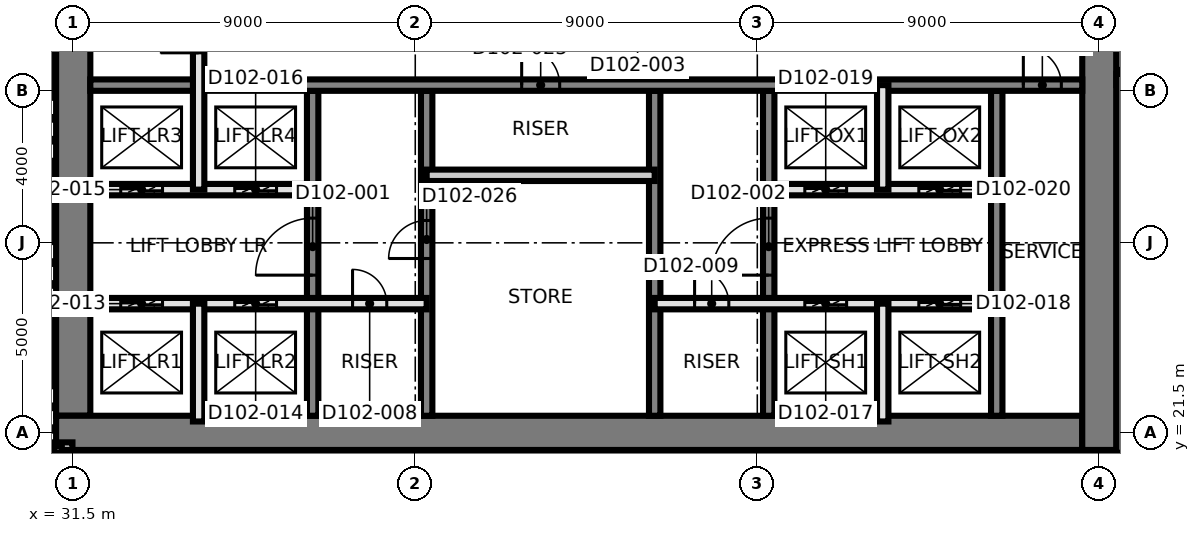
"""IFC4 building model, lengths in metres.
Left out: names, types, materials, properties, quantities, classifications, styles, units other than length and angle.
Written with IfcOpenShell. Run it as: python <this file> out.ifc"""

import sys

from ifc_helpers import new_model, si_unit, direction, frame, frame_2d, origin, place, context, subcontext, project, spatial, rectangle, extrude, element, fill, save


model = new_model("IFC4")
c1 = context("Model", 3, precision=1e-05, world=origin(), true_north=direction((0.0, 1.0)))
c2 = subcontext(c1, "Body", "Model", "MODEL_VIEW")
j1 = project(units=[si_unit("LENGTHUNIT", "METRE"), si_unit("PLANEANGLEUNIT", "RADIAN")], contexts=[c1])
p1 = place(None, origin())
s1 = spatial("IfcSite", under=j1, at=p1, CompositionType="ELEMENT")
p2 = place(p1, origin())
s2 = spatial("IfcBuilding", under=s1, at=p2, CompositionType="ELEMENT")
p3 = place(p2, origin())
s3 = spatial("IfcBuildingStorey", under=s2, at=p3, CompositionType="ELEMENT", Elevation=0.0)
p4 = place(p3, frame((31.5, 21.95, 0.0), z_axis=(0.0, 0.0, 1.0), x_axis=(0.0, 1.0, 0.0)))
e1 = element("IfcWall", 1, at=p4, inside=s3, PredefinedType="SHEAR", context=c2, shape_type="SweptSolid", body=[
    extrude(rectangle(XDim=17.1, YDim=0.9, at=frame_2d((8.55, 0.0))), origin(), (0.0, 0.0, 1.0), 8.0),
])
p5 = place(p3, frame((31.05, 21.5, 0.0), z_axis=(0.0, 0.0, 1.0), x_axis=(1.0, 0.0, 0.0)))
e2 = element("IfcWall", 2, at=p5, inside=s3, PredefinedType="SHEAR", context=c2, shape_type="SweptSolid", body=[
    extrude(rectangle(XDim=27.0, YDim=0.9, at=frame_2d((13.5, 0.0))), origin(), (0.0, 0.0, 1.0), 8.0),
])
p6 = place(p3, frame((58.5, 21.05, 0.0), z_axis=(0.0, 0.0, 1.0), x_axis=(0.0, 1.0, 0.0)))
e3 = element("IfcWall", 3, at=p6, inside=s3, PredefinedType="SHEAR", context=c2, shape_type="SweptSolid", body=[
    extrude(rectangle(XDim=18.9, YDim=0.9, at=frame_2d((9.45, 0.0))), origin(), (0.0, 0.0, 1.0), 8.0),
])
p7 = place(p3, frame((37.8, 21.95, 0.0), z_axis=(0.0, 0.0, 1.0), x_axis=(0.0, 1.0, 0.0)))
e4 = element("IfcWall", 4, at=p7, inside=s3, PredefinedType="SHEAR", context=c2, shape_type="SweptSolid", body=[
    extrude(rectangle(XDim=8.55, YDim=0.3, at=frame_2d((4.275, 0.0))), origin(), (0.0, 0.0, 1.0), 8.0),
])
p8 = place(p7, frame((3.7, 0.0, 0.0)))
e5 = element("IfcOpeningElement", 5, at=p8, cuts=e4, PredefinedType="OPENING", context=c2, shape_type="SweptSolid", body=[
    extrude(rectangle(XDim=1.5, YDim=2.1, at=frame_2d((0.75, 1.05))), frame((0.0, 0.16, 0.0), z_axis=(0.0, -1.0, 0.0), x_axis=(1.0, 0.0, 0.0)), (0.0, 0.0, 1.0), 0.32),
])
p9 = place(p3, frame((40.8, 21.95, 0.0), z_axis=(0.0, 0.0, 1.0), x_axis=(0.0, 1.0, 0.0)))
e6 = element("IfcWall", 6, at=p9, inside=s3, PredefinedType="SHEAR", context=c2, shape_type="SweptSolid", body=[
    extrude(rectangle(XDim=8.55, YDim=0.3, at=frame_2d((4.275, 0.0))), origin(), (0.0, 0.0, 1.0), 8.0),
])
p10 = place(p9, frame((4.138, 0.0, 0.0)))
e7 = element("IfcOpeningElement", 7, at=p10, cuts=e6, PredefinedType="OPENING", context=c2, shape_type="SweptSolid", body=[
    extrude(rectangle(XDim=1.0, YDim=2.1, at=frame_2d((0.5, 1.05))), frame((0.0, 0.16, 0.0), z_axis=(0.0, -1.0, 0.0), x_axis=(1.0, 0.0, 0.0)), (0.0, 0.0, 1.0), 0.32),
])
p11 = place(p3, frame((46.8, 21.95, 0.0), z_axis=(0.0, 0.0, 1.0), x_axis=(0.0, 1.0, 0.0)))
e8 = element("IfcWall", 8, at=p11, inside=s3, PredefinedType="SHEAR", context=c2, shape_type="SweptSolid", body=[
    extrude(rectangle(XDim=8.55, YDim=0.3, at=frame_2d((4.275, 0.0))), origin(), (0.0, 0.0, 1.0), 8.0),
])
p12 = place(p3, frame((49.8, 21.95, 0.0), z_axis=(0.0, 0.0, 1.0), x_axis=(0.0, 1.0, 0.0)))
e9 = element("IfcWall", 9, at=p12, inside=s3, PredefinedType="SHEAR", context=c2, shape_type="SweptSolid", body=[
    extrude(rectangle(XDim=8.55, YDim=0.3, at=frame_2d((4.275, 0.0))), origin(), (0.0, 0.0, 1.0), 8.0),
])
p13 = place(p12, frame((3.7, 0.0, 0.0)))
e10 = element("IfcOpeningElement", 10, at=p13, cuts=e9, PredefinedType="OPENING", context=c2, shape_type="SweptSolid", body=[
    extrude(rectangle(XDim=1.5, YDim=2.1, at=frame_2d((0.75, 1.05))), frame((0.0, 0.16, 0.0), z_axis=(0.0, -1.0, 0.0), x_axis=(1.0, 0.0, 0.0)), (0.0, 0.0, 1.0), 0.32),
])
p14 = place(p3, frame((55.8, 21.95, 0.0), z_axis=(0.0, 0.0, 1.0), x_axis=(0.0, 1.0, 0.0)))
e11 = element("IfcWall", 11, at=p14, inside=s3, PredefinedType="SHEAR", context=c2, shape_type="SweptSolid", body=[
    extrude(rectangle(XDim=8.55, YDim=0.3, at=frame_2d((4.275, 0.0))), origin(), (0.0, 0.0, 1.0), 8.0),
])
p15 = place(p3, frame((31.95, 30.65, 0.0), z_axis=(0.0, 0.0, 1.0), x_axis=(1.0, 0.0, 0.0)))
e12 = element("IfcWall", 12, at=p15, inside=s3, PredefinedType="SHEAR", context=c2, shape_type="SweptSolid", body=[
    extrude(rectangle(XDim=26.1, YDim=0.3, at=frame_2d((13.05, 0.0))), origin(), (0.0, 0.0, 1.0), 8.0),
])
p16 = place(p15, frame((24.55, 0.0, 0.0)))
e13 = element("IfcOpeningElement", 13, at=p16, cuts=e12, PredefinedType="OPENING", context=c2, shape_type="SweptSolid", body=[
    extrude(rectangle(XDim=1.0, YDim=2.1, at=frame_2d((0.5, 1.05))), frame((0.0, 0.16, 0.0), z_axis=(0.0, -1.0, 0.0), x_axis=(1.0, 0.0, 0.0)), (0.0, 0.0, 1.0), 0.32),
])
p17 = place(p15, frame((11.35, 0.0, 0.0)))
e14 = element("IfcOpeningElement", 14, at=p17, cuts=e12, PredefinedType="OPENING", context=c2, shape_type="SweptSolid", body=[
    extrude(rectangle(XDim=1.0, YDim=2.1, at=frame_2d((0.5, 1.05))), frame((0.0, 0.16, 0.0), z_axis=(0.0, -1.0, 0.0), x_axis=(1.0, 0.0, 0.0)), (0.0, 0.0, 1.0), 0.32),
])
p18 = place(p3, frame((31.8, 24.9, 0.0), z_axis=(0.0, 0.0, 1.0), x_axis=(1.0, 0.0, 0.0)))
e15 = element("IfcWall", 15, at=p18, inside=s3, PredefinedType="SOLIDWALL", context=c2, shape_type="SweptSolid", body=[
    extrude(rectangle(XDim=9.0, YDim=0.3, at=frame_2d((4.5, 0.0))), origin(), (0.0, 0.0, 1.0), 7.7),
])
p19 = place(p18, frame((7.05, 0.0, 0.0)))
e16 = element("IfcOpeningElement", 16, at=p19, cuts=e15, PredefinedType="OPENING", context=c2, shape_type="SweptSolid", body=[
    extrude(rectangle(XDim=0.9, YDim=2.1, at=frame_2d((0.45, 1.05))), frame((0.0, 0.16, 0.0), z_axis=(0.0, -1.0, 0.0), x_axis=(1.0, 0.0, 0.0)), (0.0, 0.0, 1.0), 0.32),
])
p20 = place(p18, frame((0.95, 0.0, 0.0)))
e17 = element("IfcOpeningElement", 17, at=p20, cuts=e15, PredefinedType="OPENING", context=c2, shape_type="SweptSolid", body=[
    extrude(rectangle(XDim=1.1, YDim=2.4, at=frame_2d((0.55, 1.2))), frame((0.0, 0.16, 0.0), z_axis=(0.0, -1.0, 0.0), x_axis=(1.0, 0.0, 0.0)), (0.0, 0.0, 1.0), 0.32),
])
p21 = place(p18, frame((3.95, 0.0, 0.0)))
e18 = element("IfcOpeningElement", 18, at=p21, cuts=e15, PredefinedType="OPENING", context=c2, shape_type="SweptSolid", body=[
    extrude(rectangle(XDim=1.1, YDim=2.4, at=frame_2d((0.55, 1.2))), frame((0.0, 0.16, 0.0), z_axis=(0.0, -1.0, 0.0), x_axis=(1.0, 0.0, 0.0)), (0.0, 0.0, 1.0), 0.32),
])
p22 = place(p3, frame((46.8, 24.9, 0.0), z_axis=(0.0, 0.0, 1.0), x_axis=(1.0, 0.0, 0.0)))
e19 = element("IfcWall", 19, at=p22, inside=s3, PredefinedType="SOLIDWALL", context=c2, shape_type="SweptSolid", body=[
    extrude(rectangle(XDim=9.0, YDim=0.3, at=frame_2d((4.5, 0.0))), origin(), (0.0, 0.0, 1.0), 7.7),
])
p23 = place(p22, frame((1.05, 0.0, 0.0)))
e20 = element("IfcOpeningElement", 20, at=p23, cuts=e19, PredefinedType="OPENING", context=c2, shape_type="SweptSolid", body=[
    extrude(rectangle(XDim=0.9, YDim=2.1, at=frame_2d((0.45, 1.05))), frame((0.0, 0.16, 0.0), z_axis=(0.0, -1.0, 0.0), x_axis=(1.0, 0.0, 0.0)), (0.0, 0.0, 1.0), 0.32),
])
p24 = place(p22, frame((3.95, 0.0, 0.0)))
e21 = element("IfcOpeningElement", 21, at=p24, cuts=e19, PredefinedType="OPENING", context=c2, shape_type="SweptSolid", body=[
    extrude(rectangle(XDim=1.1, YDim=2.4, at=frame_2d((0.55, 1.2))), frame((0.0, 0.16, 0.0), z_axis=(0.0, -1.0, 0.0), x_axis=(1.0, 0.0, 0.0)), (0.0, 0.0, 1.0), 0.32),
])
p25 = place(p22, frame((6.95, 0.0, 0.0)))
e22 = element("IfcOpeningElement", 22, at=p25, cuts=e19, PredefinedType="OPENING", context=c2, shape_type="SweptSolid", body=[
    extrude(rectangle(XDim=1.1, YDim=2.4, at=frame_2d((0.55, 1.2))), frame((0.0, 0.16, 0.0), z_axis=(0.0, -1.0, 0.0), x_axis=(1.0, 0.0, 0.0)), (0.0, 0.0, 1.0), 0.32),
])
p26 = place(p3, frame((31.8, 27.9, 0.0), z_axis=(0.0, 0.0, 1.0), x_axis=(1.0, 0.0, 0.0)))
e23 = element("IfcWall", 23, at=p26, inside=s3, PredefinedType="SOLIDWALL", context=c2, shape_type="SweptSolid", body=[
    extrude(rectangle(XDim=6.0, YDim=0.3, at=frame_2d((3.0, 0.0))), origin(), (0.0, 0.0, 1.0), 7.7),
])
p27 = place(p26, frame((0.95, 0.0, 0.0)))
e24 = element("IfcOpeningElement", 24, at=p27, cuts=e23, PredefinedType="OPENING", context=c2, shape_type="SweptSolid", body=[
    extrude(rectangle(XDim=1.1, YDim=2.4, at=frame_2d((0.55, 1.2))), frame((0.0, 0.16, 0.0), z_axis=(0.0, -1.0, 0.0), x_axis=(1.0, 0.0, 0.0)), (0.0, 0.0, 1.0), 0.32),
])
p28 = place(p26, frame((3.95, 0.0, 0.0)))
e25 = element("IfcOpeningElement", 25, at=p28, cuts=e23, PredefinedType="OPENING", context=c2, shape_type="SweptSolid", body=[
    extrude(rectangle(XDim=1.1, YDim=2.4, at=frame_2d((0.55, 1.2))), frame((0.0, 0.16, 0.0), z_axis=(0.0, -1.0, 0.0), x_axis=(1.0, 0.0, 0.0)), (0.0, 0.0, 1.0), 0.32),
])
p29 = place(p3, frame((49.8, 27.9, 0.0), z_axis=(0.0, 0.0, 1.0), x_axis=(1.0, 0.0, 0.0)))
e26 = element("IfcWall", 26, at=p29, inside=s3, PredefinedType="SOLIDWALL", context=c2, shape_type="SweptSolid", body=[
    extrude(rectangle(XDim=6.0, YDim=0.3, at=frame_2d((3.0, 0.0))), origin(), (0.0, 0.0, 1.0), 7.7),
])
p30 = place(p29, frame((0.95, 0.0, 0.0)))
e27 = element("IfcOpeningElement", 27, at=p30, cuts=e26, PredefinedType="OPENING", context=c2, shape_type="SweptSolid", body=[
    extrude(rectangle(XDim=1.1, YDim=2.4, at=frame_2d((0.55, 1.2))), frame((0.0, 0.16, 0.0), z_axis=(0.0, -1.0, 0.0), x_axis=(1.0, 0.0, 0.0)), (0.0, 0.0, 1.0), 0.32),
])
p31 = place(p29, frame((3.95, 0.0, 0.0)))
e28 = element("IfcOpeningElement", 28, at=p31, cuts=e26, PredefinedType="OPENING", context=c2, shape_type="SweptSolid", body=[
    extrude(rectangle(XDim=1.1, YDim=2.4, at=frame_2d((0.55, 1.2))), frame((0.0, 0.16, 0.0), z_axis=(0.0, -1.0, 0.0), x_axis=(1.0, 0.0, 0.0)), (0.0, 0.0, 1.0), 0.32),
])
p32 = place(p3, frame((40.8, 28.277, 0.0), z_axis=(0.0, 0.0, 1.0), x_axis=(1.0, 0.0, 0.0)))
e29 = element("IfcWall", 29, at=p32, inside=s3, PredefinedType="PARTITIONING", context=c2, shape_type="SweptSolid", body=[
    extrude(rectangle(XDim=6.0, YDim=0.3, at=frame_2d((3.0, 0.0))), origin(), (0.0, 0.0, 1.0), 7.7),
])
p33 = place(p3, frame((34.8, 21.8, 0.0), z_axis=(0.0, 0.0, 1.0), x_axis=(0.0, 1.0, 0.0)))
e30 = element("IfcWall", 30, at=p33, inside=s3, PredefinedType="SOLIDWALL", context=c2, shape_type="SweptSolid", body=[
    extrude(rectangle(XDim=3.1, YDim=0.3, at=frame_2d((1.55, 0.0))), origin(), (0.0, 0.0, 1.0), 7.7),
])
p34 = place(p3, frame((34.8, 27.9, 0.0), z_axis=(0.0, 0.0, 1.0), x_axis=(0.0, 1.0, 0.0)))
e31 = element("IfcWall", 31, at=p34, inside=s3, PredefinedType="SOLIDWALL", context=c2, shape_type="SweptSolid", body=[
    extrude(rectangle(XDim=5.45, YDim=0.3, at=frame_2d((2.725, 0.0))), origin(), (0.0, 0.0, 1.0), 7.7),
])
p35 = place(p34, frame((3.6, 0.0, 0.0)))
e32 = element("IfcOpeningElement", 32, at=p35, cuts=e31, PredefinedType="OPENING", context=c2, shape_type="SweptSolid", body=[
    extrude(rectangle(XDim=1.0, YDim=2.1, at=frame_2d((0.5, 1.05))), frame((0.0, 0.16, 0.0), z_axis=(0.0, -1.0, 0.0), x_axis=(1.0, 0.0, 0.0)), (0.0, 0.0, 1.0), 0.32),
])
p36 = place(p3, frame((52.8, 21.8, 0.0), z_axis=(0.0, 0.0, 1.0), x_axis=(0.0, 1.0, 0.0)))
e33 = element("IfcWall", 33, at=p36, inside=s3, PredefinedType="SOLIDWALL", context=c2, shape_type="SweptSolid", body=[
    extrude(rectangle(XDim=3.1, YDim=0.3, at=frame_2d((1.55, 0.0))), origin(), (0.0, 0.0, 1.0), 7.7),
])
p37 = place(p3, frame((52.8, 27.9, 0.0), z_axis=(0.0, 0.0, 1.0), x_axis=(0.0, 1.0, 0.0)))
e34 = element("IfcWall", 34, at=p37, inside=s3, PredefinedType="SOLIDWALL", context=c2, shape_type="SweptSolid", body=[
    extrude(rectangle(XDim=2.75, YDim=0.3, at=frame_2d((1.375, 0.0))), origin(), (0.0, 0.0, 1.0), 7.7),
])
p38 = place(p3, frame((59.1, 30.65, 0.0), z_axis=(0.0, 0.0, 1.0), x_axis=(0.0, 1.0, 0.0)))
e35 = element("IfcWall", 35, at=p38, inside=s3, PredefinedType="PARTITIONING", context=c2, shape_type="SweptSolid", body=[
    extrude(rectangle(XDim=2.7, YDim=0.3, at=frame_2d((1.35, 0.0))), origin(), (0.0, 0.0, 1.0), 7.7),
])
p39 = place(p3, frame((21.07, 21.15, 0.0), z_axis=(0.0, 0.0, 1.0), x_axis=(1.0, 0.0, 0.0)))
e36 = element("IfcWall", 36, at=p39, inside=s3, PredefinedType="PARTITIONING", context=c2, shape_type="SweptSolid", body=[
    extrude(rectangle(XDim=10.41, YDim=0.2, at=frame_2d((5.205, 0.0))), origin(), (0.0, 0.0, 1.0), 6.8),
])
p40 = place(p3, frame((58.97, 30.95, 0.0), z_axis=(0.0, 0.0, 1.0), x_axis=(1.0, 0.0, 0.0)))
e37 = element("IfcWall", 37, at=p40, inside=s3, PredefinedType="PARTITIONING", context=c2, shape_type="SweptSolid", body=[
    extrude(rectangle(XDim=27.93, YDim=0.2, at=frame_2d((13.965, 0.0))), origin(), (0.0, 0.0, 1.0), 7.7),
])
p41 = place(p40, frame((6.13, 0.0, 0.0)))
e38 = element("IfcOpeningElement", 38, at=p41, cuts=e37, PredefinedType="OPENING", context=c2, shape_type="SweptSolid", body=[
    extrude(rectangle(XDim=1.4, YDim=2.1, at=frame_2d((0.7, 1.05))), frame((0.0, 0.11, 0.0), z_axis=(0.0, -1.0, 0.0), x_axis=(1.0, 0.0, 0.0)), (0.0, 0.0, 1.0), 0.22),
])
p42 = place(p40, frame((15.53, 0.0, 0.0)))
e39 = element("IfcOpeningElement", 39, at=p42, cuts=e37, PredefinedType="OPENING", context=c2, shape_type="SweptSolid", body=[
    extrude(rectangle(XDim=1.0, YDim=2.1, at=frame_2d((0.5, 1.05))), frame((0.0, 0.11, 0.0), z_axis=(0.0, -1.0, 0.0), x_axis=(1.0, 0.0, 0.0)), (0.0, 0.0, 1.0), 0.22),
])
p43 = place(p40, frame((22.73, 0.0, 0.0)))
e40 = element("IfcOpeningElement", 40, at=p43, cuts=e37, PredefinedType="OPENING", context=c2, shape_type="SweptSolid", body=[
    extrude(rectangle(XDim=1.0, YDim=2.1, at=frame_2d((0.5, 1.05))), frame((0.0, 0.11, 0.0), z_axis=(0.0, -1.0, 0.0), x_axis=(1.0, 0.0, 0.0)), (0.0, 0.0, 1.0), 0.22),
])
p44 = place(p3, frame((31.1, 11.07, 0.0), z_axis=(0.0, 0.0, 1.0), x_axis=(0.0, 1.0, 0.0)))
e41 = element("IfcWall", 41, at=p44, inside=s3, PredefinedType="PARTITIONING", context=c2, shape_type="SweptSolid", body=[
    extrude(rectangle(XDim=10.08, YDim=0.2, at=frame_2d((5.04, 0.0))), origin(), (0.0, 0.0, 1.0), 6.8),
])
p45 = place(p44, frame((4.373, 0.0, 0.0)))
e42 = element("IfcOpeningElement", 42, at=p45, cuts=e41, PredefinedType="OPENING", context=c2, shape_type="SweptSolid", body=[
    extrude(rectangle(XDim=1.2, YDim=2.1, at=frame_2d((0.6, 1.05))), frame((0.0, 0.11, 0.0), z_axis=(0.0, -1.0, 0.0), x_axis=(1.0, 0.0, 0.0)), (0.0, 0.0, 1.0), 0.22),
])
p46 = place(p3, frame((59.05, 11.07, 0.0), z_axis=(0.0, 0.0, 1.0), x_axis=(0.0, 1.0, 0.0)))
e43 = element("IfcWall", 43, at=p46, inside=s3, PredefinedType="PARTITIONING", context=c2, shape_type="SweptSolid", body=[
    extrude(rectangle(XDim=19.88, YDim=0.2, at=frame_2d((9.94, 0.0))), origin(), (0.0, 0.0, 1.0), 6.8),
])
p47 = place(p46, frame((3.93, 0.0, 0.0)))
e44 = element("IfcOpeningElement", 44, at=p47, cuts=e43, PredefinedType="OPENING", context=c2, shape_type="SweptSolid", body=[
    extrude(rectangle(XDim=2.0, YDim=2.1, at=frame_2d((1.0, 1.05))), frame((0.0, 0.11, 0.0), z_axis=(0.0, -1.0, 0.0), x_axis=(1.0, 0.0, 0.0)), (0.0, 0.0, 1.0), 0.22),
])
p48 = place(p8, origin())
e45 = element("IfcDoor", 45, at=p48, inside=s3, OperationType="SINGLE_SWING_LEFT", PredefinedType="DOOR", context=c2, shape_type="SweptSolid", body=[
    extrude(rectangle(XDim=1.5, YDim=2.1, at=frame_2d((0.75, 1.05))), frame((0.0, 0.025, 0.0), z_axis=(0.0, -1.0, 0.0), x_axis=(1.0, 0.0, 0.0)), (0.0, 0.0, 1.0), 0.05),
])
fill(e5, e45)
p49 = place(p13, origin())
e46 = element("IfcDoor", 46, at=p49, inside=s3, OperationType="SINGLE_SWING_LEFT", PredefinedType="DOOR", context=c2, shape_type="SweptSolid", body=[
    extrude(rectangle(XDim=1.5, YDim=2.1, at=frame_2d((0.75, 1.05))), frame((0.0, 0.025, 0.0), z_axis=(0.0, -1.0, 0.0), x_axis=(1.0, 0.0, 0.0)), (0.0, 0.0, 1.0), 0.05),
])
fill(e10, e46)
p50 = place(p19, origin())
e47 = element("IfcDoor", 47, at=p50, inside=s3, OperationType="SINGLE_SWING_LEFT", PredefinedType="DOOR", context=c2, shape_type="SweptSolid", body=[
    extrude(rectangle(XDim=0.9, YDim=2.1, at=frame_2d((0.45, 1.05))), frame((0.0, 0.025, 0.0), z_axis=(0.0, -1.0, 0.0), x_axis=(1.0, 0.0, 0.0)), (0.0, 0.0, 1.0), 0.05),
])
fill(e16, e47)
p51 = place(p23, origin())
e48 = element("IfcDoor", 48, at=p51, inside=s3, OperationType="SINGLE_SWING_RIGHT", PredefinedType="DOOR", context=c2, shape_type="SweptSolid", body=[
    extrude(rectangle(XDim=0.9, YDim=2.1, at=frame_2d((0.45, 1.05))), frame((0.0, 0.025, 0.0), z_axis=(0.0, -1.0, 0.0), x_axis=(1.0, 0.0, 0.0)), (0.0, 0.0, 1.0), 0.05),
])
fill(e20, e48)
p52 = place(p16, origin())
e49 = element("IfcDoor", 49, at=p52, inside=s3, OperationType="SINGLE_SWING_LEFT", PredefinedType="DOOR", context=c2, shape_type="SweptSolid", body=[
    extrude(rectangle(XDim=1.0, YDim=2.1, at=frame_2d((0.5, 1.05))), frame((0.0, 0.025, 0.0), z_axis=(0.0, -1.0, 0.0), x_axis=(1.0, 0.0, 0.0)), (0.0, 0.0, 1.0), 0.05),
])
fill(e13, e49)
p53 = place(p20, origin())
e50 = element("IfcDoor", 50, at=p53, inside=s3, OperationType="SLIDING_TO_LEFT", PredefinedType="DOOR", context=c2, shape_type="SweptSolid", body=[
    extrude(rectangle(XDim=1.1, YDim=2.4, at=frame_2d((0.55, 1.2))), frame((0.0, 0.025, 0.0), z_axis=(0.0, -1.0, 0.0), x_axis=(1.0, 0.0, 0.0)), (0.0, 0.0, 1.0), 0.05),
])
fill(e17, e50)
p54 = place(p21, origin())
e51 = element("IfcDoor", 51, at=p54, inside=s3, OperationType="SLIDING_TO_LEFT", PredefinedType="DOOR", context=c2, shape_type="SweptSolid", body=[
    extrude(rectangle(XDim=1.1, YDim=2.4, at=frame_2d((0.55, 1.2))), frame((0.0, 0.025, 0.0), z_axis=(0.0, -1.0, 0.0), x_axis=(1.0, 0.0, 0.0)), (0.0, 0.0, 1.0), 0.05),
])
fill(e18, e51)
p55 = place(p27, origin())
e52 = element("IfcDoor", 52, at=p55, inside=s3, OperationType="SLIDING_TO_LEFT", PredefinedType="DOOR", context=c2, shape_type="SweptSolid", body=[
    extrude(rectangle(XDim=1.1, YDim=2.4, at=frame_2d((0.55, 1.2))), frame((0.0, 0.025, 0.0), z_axis=(0.0, -1.0, 0.0), x_axis=(1.0, 0.0, 0.0)), (0.0, 0.0, 1.0), 0.05),
])
fill(e24, e52)
p56 = place(p28, origin())
e53 = element("IfcDoor", 53, at=p56, inside=s3, OperationType="SLIDING_TO_LEFT", PredefinedType="DOOR", context=c2, shape_type="SweptSolid", body=[
    extrude(rectangle(XDim=1.1, YDim=2.4, at=frame_2d((0.55, 1.2))), frame((0.0, 0.025, 0.0), z_axis=(0.0, -1.0, 0.0), x_axis=(1.0, 0.0, 0.0)), (0.0, 0.0, 1.0), 0.05),
])
fill(e25, e53)
p57 = place(p24, origin())
e54 = element("IfcDoor", 54, at=p57, inside=s3, OperationType="SLIDING_TO_LEFT", PredefinedType="DOOR", context=c2, shape_type="SweptSolid", body=[
    extrude(rectangle(XDim=1.1, YDim=2.4, at=frame_2d((0.55, 1.2))), frame((0.0, 0.025, 0.0), z_axis=(0.0, -1.0, 0.0), x_axis=(1.0, 0.0, 0.0)), (0.0, 0.0, 1.0), 0.05),
])
fill(e21, e54)
p58 = place(p25, origin())
e55 = element("IfcDoor", 55, at=p58, inside=s3, OperationType="SLIDING_TO_LEFT", PredefinedType="DOOR", context=c2, shape_type="SweptSolid", body=[
    extrude(rectangle(XDim=1.1, YDim=2.4, at=frame_2d((0.55, 1.2))), frame((0.0, 0.025, 0.0), z_axis=(0.0, -1.0, 0.0), x_axis=(1.0, 0.0, 0.0)), (0.0, 0.0, 1.0), 0.05),
])
fill(e22, e55)
p59 = place(p30, origin())
e56 = element("IfcDoor", 56, at=p59, inside=s3, OperationType="SLIDING_TO_LEFT", PredefinedType="DOOR", context=c2, shape_type="SweptSolid", body=[
    extrude(rectangle(XDim=1.1, YDim=2.4, at=frame_2d((0.55, 1.2))), frame((0.0, 0.025, 0.0), z_axis=(0.0, -1.0, 0.0), x_axis=(1.0, 0.0, 0.0)), (0.0, 0.0, 1.0), 0.05),
])
fill(e27, e56)
p60 = place(p31, origin())
e57 = element("IfcDoor", 57, at=p60, inside=s3, OperationType="SLIDING_TO_LEFT", PredefinedType="DOOR", context=c2, shape_type="SweptSolid", body=[
    extrude(rectangle(XDim=1.1, YDim=2.4, at=frame_2d((0.55, 1.2))), frame((0.0, 0.025, 0.0), z_axis=(0.0, -1.0, 0.0), x_axis=(1.0, 0.0, 0.0)), (0.0, 0.0, 1.0), 0.05),
])
fill(e28, e57)
p61 = place(p17, origin())
e58 = element("IfcDoor", 58, at=p61, inside=s3, OperationType="SINGLE_SWING_LEFT", PredefinedType="DOOR", context=c2, shape_type="SweptSolid", body=[
    extrude(rectangle(XDim=1.0, YDim=2.1, at=frame_2d((0.5, 1.05))), frame((0.0, 0.025, 0.0), z_axis=(0.0, -1.0, 0.0), x_axis=(1.0, 0.0, 0.0)), (0.0, 0.0, 1.0), 0.05),
])
fill(e14, e58)
p62 = place(p10, origin())
e59 = element("IfcDoor", 59, at=p62, inside=s3, OperationType="SINGLE_SWING_RIGHT", PredefinedType="DOOR", context=c2, shape_type="SweptSolid", body=[
    extrude(rectangle(XDim=1.0, YDim=2.1, at=frame_2d((0.5, 1.05))), frame((0.0, 0.025, 0.0), z_axis=(0.0, -1.0, 0.0), x_axis=(1.0, 0.0, 0.0)), (0.0, 0.0, 1.0), 0.05),
])
fill(e7, e59)
save(model, sys.argv[1])
